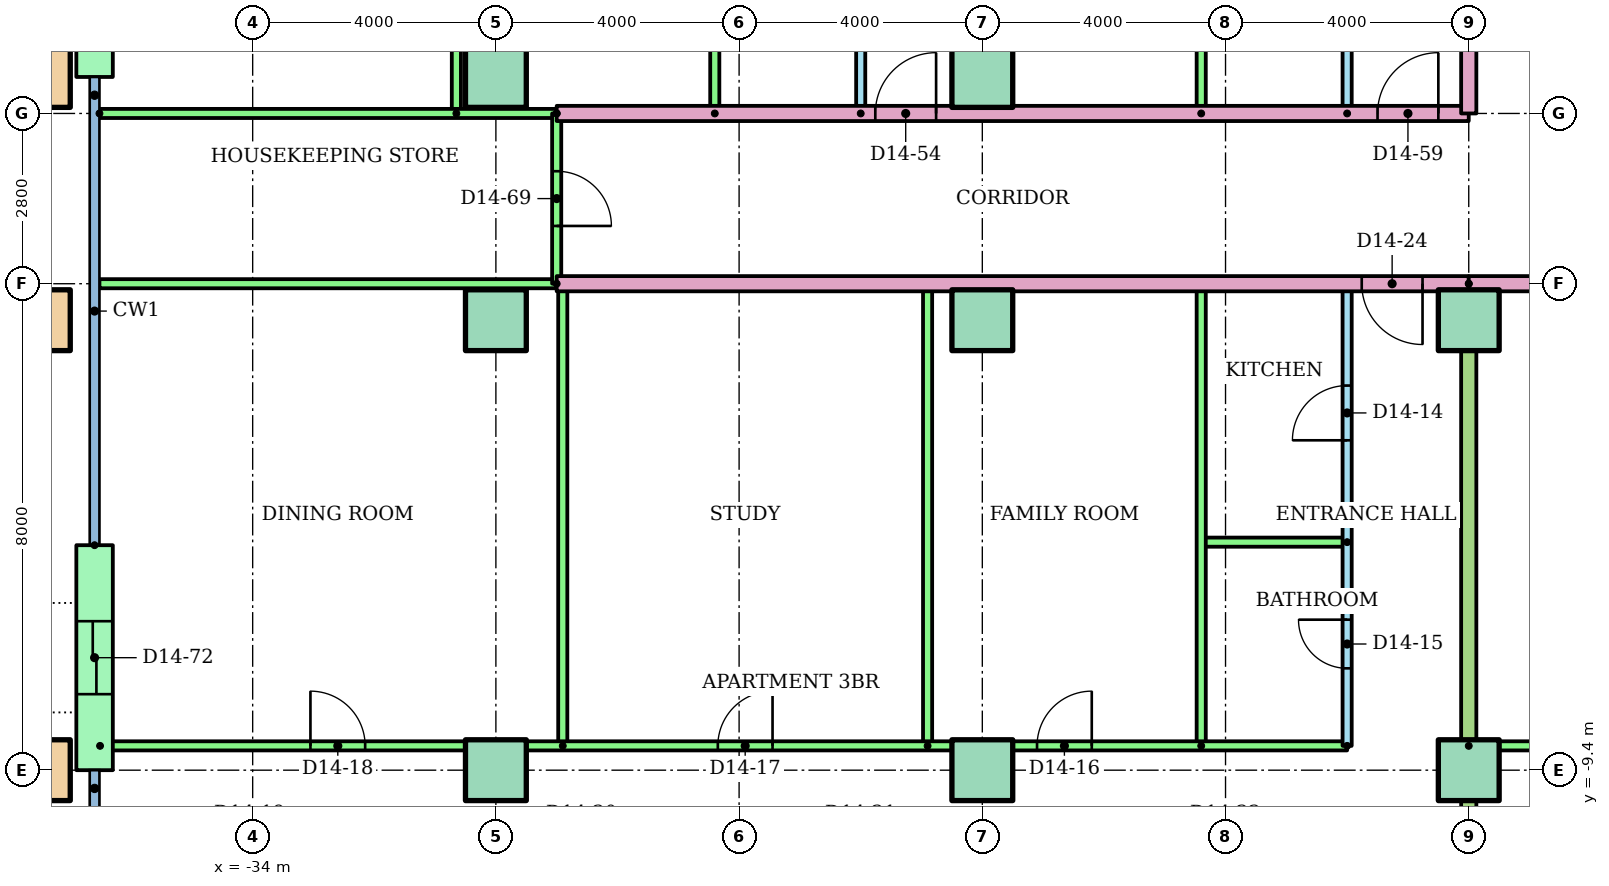
"""IFC4 building model, lengths in metres.
Left out: names, types, materials, properties, quantities, classifications, styles, units other than length and angle.
Written with IfcOpenShell. Run it as: python <this file> out.ifc"""

import sys

from ifc_helpers import new_model, si_unit, direction, frame, frame_2d, origin, origin_2d, place, context, subcontext, project, spatial, rectangle, hollow_rectangle, extrude, element, fill, save


model = new_model("IFC4")
c1 = context("Model", 3, precision=1e-05, world=origin(), true_north=direction((0.0, 1.0)))
c2 = subcontext(c1, "Body", "Model", "MODEL_VIEW")
j1 = project(units=[si_unit("LENGTHUNIT", "METRE"), si_unit("PLANEANGLEUNIT", "RADIAN")], contexts=[c1])
p1 = place(None, origin())
s1 = spatial("IfcSite", under=j1, at=p1, CompositionType="ELEMENT")
p2 = place(p1, origin())
s2 = spatial("IfcBuilding", under=s1, at=p2, CompositionType="ELEMENT")
p3 = place(p2, frame((0.0, 0.0, 54.4)))
s3 = spatial("IfcBuildingStorey", under=s2, at=p3, CompositionType="ELEMENT", Elevation=54.4)
p4 = place(p3, frame((-37.5, -9.4, 0.0)))
e1 = element("IfcColumn", 1, at=p4, inside=s3, PredefinedType="COLUMN", context=c2, shape_type="SweptSolid", body=[
    extrude(hollow_rectangle(XDim=1.0, YDim=1.0, WallThickness=0.05, at=origin_2d()), origin(), (0.0, 0.0, 1.0), 3.2),
])
for number, where in (
    (2, (-30.0, -9.4, 0.0)),
    (3, (-22.0, -9.4, 0.0)),
    (4, (-14.0, -9.4, 0.0)),
):
    element("IfcColumn", number, at=place(p3, frame(where)), inside=s3, PredefinedType="COLUMN", context=c2, shape_type="SweptSolid", body=[
        extrude(rectangle(XDim=1.0, YDim=1.0, at=origin_2d()), origin(), (0.0, 0.0, 1.0), 3.2),
    ])
p5 = place(p3, frame((-37.5, -2.0, 0.0)))
e5 = element("IfcColumn", 5, at=p5, inside=s3, PredefinedType="COLUMN", context=c2, shape_type="SweptSolid", body=[
    extrude(hollow_rectangle(XDim=1.0, YDim=1.0, WallThickness=0.05, at=origin_2d()), origin(), (0.0, 0.0, 1.0), 3.2),
])
for number, where in (
    (6, (-30.0, -2.0, 0.0)),
    (7, (-22.0, -2.0, 0.0)),
    (8, (-14.0, -2.0, 0.0)),
):
    element("IfcColumn", number, at=place(p3, frame(where)), inside=s3, PredefinedType="COLUMN", context=c2, shape_type="SweptSolid", body=[
        extrude(rectangle(XDim=1.0, YDim=1.0, at=origin_2d()), origin(), (0.0, 0.0, 1.0), 3.2),
    ])
p6 = place(p3, frame((-37.5, 2.0, 0.0)))
e9 = element("IfcColumn", 9, at=p6, inside=s3, PredefinedType="COLUMN", context=c2, shape_type="SweptSolid", body=[
    extrude(hollow_rectangle(XDim=1.0, YDim=1.0, WallThickness=0.05, at=origin_2d()), origin(), (0.0, 0.0, 1.0), 3.2),
])
for number, where in (
    (10, (-30.0, 2.0, 0.0)),
    (11, (-22.0, 2.0, 0.0)),
):
    element("IfcColumn", number, at=place(p3, frame(where)), inside=s3, PredefinedType="COLUMN", context=c2, shape_type="SweptSolid", body=[
        extrude(rectangle(XDim=1.0, YDim=1.0, at=origin_2d()), origin(), (0.0, 0.0, 1.0), 3.2),
    ])
p7 = place(p3, frame((-36.6, 6.5, 0.0), z_axis=(0.0, 0.0, 1.0), x_axis=(0.0, -1.0, 0.0)))
e12 = element("IfcWall", 12, at=p7, inside=s3, PredefinedType="STANDARD", context=c2, shape_type="SweptSolid", body=[
    extrude(rectangle(XDim=4.5, YDim=0.6, at=frame_2d((2.25, 0.0))), origin(), (0.0, 0.0, 1.0), 2.92),
])
p8 = place(p7, frame((1.65, 0.0, 0.0)))
e13 = element("IfcOpeningElement", 13, at=p8, cuts=e12, PredefinedType="OPENING", context=c2, shape_type="SweptSolid", body=[
    extrude(rectangle(XDim=1.2, YDim=2.1, at=frame_2d((0.6, 1.05))), frame((0.0, 0.31, 0.0), z_axis=(0.0, -1.0, 0.0), x_axis=(1.0, 0.0, 0.0)), (0.0, 0.0, 1.0), 0.62),
])
p9 = place(p3, frame((-36.6, -5.7, 0.0), z_axis=(0.0, 0.0, 1.0), x_axis=(0.0, -1.0, 0.0)))
e14 = element("IfcWall", 14, at=p9, inside=s3, PredefinedType="STANDARD", context=c2, shape_type="SweptSolid", body=[
    extrude(rectangle(XDim=3.7, YDim=0.6, at=frame_2d((1.85, 0.0))), origin(), (0.0, 0.0, 1.0), 2.92),
])
p10 = place(p9, frame((1.25, 0.0, 0.0)))
e15 = element("IfcOpeningElement", 15, at=p10, cuts=e14, PredefinedType="OPENING", context=c2, shape_type="SweptSolid", body=[
    extrude(rectangle(XDim=1.2, YDim=2.1, at=frame_2d((0.6, 1.05))), frame((0.0, 0.31, 0.0), z_axis=(0.0, -1.0, 0.0), x_axis=(1.0, 0.0, 0.0)), (0.0, 0.0, 1.0), 0.62),
])
p11 = place(p3, frame((-16.0, -9.0, 0.0), z_axis=(0.0, 0.0, 1.0), x_axis=(0.0, 1.0, 0.0)))
e16 = element("IfcWall", 16, at=p11, inside=s3, PredefinedType="PARTITIONING", context=c2, shape_type="SweptSolid", body=[
    extrude(rectangle(XDim=7.6, YDim=0.15, at=frame_2d((3.8, 0.0))), origin(), (0.0, 0.0, 1.0), 2.4),
])
p12 = place(p11, frame((5.025, 0.0, 0.0)))
e17 = element("IfcOpeningElement", 17, at=p12, cuts=e16, PredefinedType="OPENING", context=c2, shape_type="SweptSolid", body=[
    extrude(rectangle(XDim=0.9, YDim=2.1, at=frame_2d((0.45, 1.05))), frame((0.0, 0.085, 0.0), z_axis=(0.0, -1.0, 0.0), x_axis=(1.0, 0.0, 0.0)), (0.0, 0.0, 1.0), 0.17),
])
p13 = place(p11, frame((1.275, 0.0, 0.0)))
e18 = element("IfcOpeningElement", 18, at=p13, cuts=e16, PredefinedType="OPENING", context=c2, shape_type="SweptSolid", body=[
    extrude(rectangle(XDim=0.8, YDim=2.1, at=frame_2d((0.4, 1.05))), frame((0.0, 0.085, 0.0), z_axis=(0.0, -1.0, 0.0), x_axis=(1.0, 0.0, 0.0)), (0.0, 0.0, 1.0), 0.17),
])
p14 = place(p3, frame((-16.0, -5.65, 0.0), z_axis=(0.0, 0.0, 1.0), x_axis=(-1.0, 0.0, 0.0)))
e19 = element("IfcWall", 19, at=p14, inside=s3, PredefinedType="PARTITIONING", context=c2, shape_type="SweptSolid", body=[
    extrude(rectangle(XDim=2.4, YDim=0.15, at=frame_2d((1.2, 0.0))), origin(), (0.0, 0.0, 1.0), 2.4),
])
for number, where, z_axis, x_axis in (
    (20, (-18.4, -9.0, 0.0), (0.0, 0.0, 1.0), (0.0, 1.0, 0.0)),
    (21, (-22.9, -9.0, 0.0), (0.0, 0.0, 1.0), (0.0, 1.0, 0.0)),
    (22, (-28.9, -9.0, 0.0), (0.0, 0.0, 1.0), (0.0, 1.0, 0.0)),
):
    element("IfcWall", number, at=place(p3, frame(where, z_axis=z_axis, x_axis=x_axis)), inside=s3, PredefinedType="PARTITIONING", context=c2, shape_type="SweptSolid", body=[
        extrude(rectangle(XDim=7.6, YDim=0.15, at=frame_2d((3.8, 0.0))), origin(), (0.0, 0.0, 1.0), 2.4),
    ])
p15 = place(p3, frame((-36.51, -9.0, 0.0)))
e23 = element("IfcWall", 23, at=p15, inside=s3, PredefinedType="PARTITIONING", context=c2, shape_type="SweptSolid", body=[
    extrude(rectangle(XDim=20.51, YDim=0.15, at=frame_2d((10.255, 0.0))), origin(), (0.0, 0.0, 1.0), 2.4),
])
p16 = place(p15, frame((15.41, 0.0, 0.0)))
e24 = element("IfcOpeningElement", 24, at=p16, cuts=e23, PredefinedType="OPENING", context=c2, shape_type="SweptSolid", body=[
    extrude(rectangle(XDim=0.9, YDim=2.1, at=frame_2d((0.45, 1.05))), frame((0.0, 0.085, 0.0), z_axis=(0.0, -1.0, 0.0), x_axis=(1.0, 0.0, 0.0)), (0.0, 0.0, 1.0), 0.17),
])
p17 = place(p15, frame((10.16, 0.0, 0.0)))
e25 = element("IfcOpeningElement", 25, at=p17, cuts=e23, PredefinedType="OPENING", context=c2, shape_type="SweptSolid", body=[
    extrude(rectangle(XDim=0.9, YDim=2.1, at=frame_2d((0.45, 1.05))), frame((0.0, 0.085, 0.0), z_axis=(0.0, -1.0, 0.0), x_axis=(1.0, 0.0, 0.0)), (0.0, 0.0, 1.0), 0.17),
])
p18 = place(p15, frame((3.46, 0.0, 0.0)))
e26 = element("IfcOpeningElement", 26, at=p18, cuts=e23, PredefinedType="OPENING", context=c2, shape_type="SweptSolid", body=[
    extrude(rectangle(XDim=0.9, YDim=2.1, at=frame_2d((0.45, 1.05))), frame((0.0, 0.085, 0.0), z_axis=(0.0, -1.0, 0.0), x_axis=(1.0, 0.0, 0.0)), (0.0, 0.0, 1.0), 0.17),
])
p19 = place(p3, frame((-14.0, -9.0, 0.0)))
e27 = element("IfcWall", 27, at=p19, inside=s3, PredefinedType="PARTITIONING", context=c2, shape_type="SweptSolid", body=[
    extrude(rectangle(XDim=22.0, YDim=0.15, at=frame_2d((11.0, 0.0))), origin(), (0.0, 0.0, 1.0), 2.4),
])
p20 = place(p19, frame((16.76, 0.0, 0.0)))
e28 = element("IfcOpeningElement", 28, at=p20, cuts=e27, PredefinedType="OPENING", context=c2, shape_type="SweptSolid", body=[
    extrude(rectangle(XDim=0.9, YDim=2.1, at=frame_2d((0.45, 1.05))), frame((0.0, 0.085, 0.0), z_axis=(0.0, -1.0, 0.0), x_axis=(1.0, 0.0, 0.0)), (0.0, 0.0, 1.0), 0.17),
])
p21 = place(p19, frame((10.9, 0.0, 0.0)))
e29 = element("IfcOpeningElement", 29, at=p21, cuts=e27, PredefinedType="OPENING", context=c2, shape_type="SweptSolid", body=[
    extrude(rectangle(XDim=0.9, YDim=2.1, at=frame_2d((0.45, 1.05))), frame((0.0, 0.085, 0.0), z_axis=(0.0, -1.0, 0.0), x_axis=(1.0, 0.0, 0.0)), (0.0, 0.0, 1.0), 0.17),
])
p22 = place(p19, frame((3.6, 0.0, 0.0)))
e30 = element("IfcOpeningElement", 30, at=p22, cuts=e27, PredefinedType="OPENING", context=c2, shape_type="SweptSolid", body=[
    extrude(rectangle(XDim=0.9, YDim=2.1, at=frame_2d((0.45, 1.05))), frame((0.0, 0.085, 0.0), z_axis=(0.0, -1.0, 0.0), x_axis=(1.0, 0.0, 0.0)), (0.0, 0.0, 1.0), 0.17),
])
p23 = place(p3, frame((-14.0, -1.4, 0.0), z_axis=(0.0, 0.0, 1.0), x_axis=(0.0, -1.0, 0.0)))
e31 = element("IfcWall", 31, at=p23, inside=s3, PredefinedType="PARTITIONING", context=c2, shape_type="SweptSolid", body=[
    extrude(rectangle(XDim=14.71, YDim=0.25, at=frame_2d((7.355, 0.0))), origin(), (0.0, 0.0, 1.0), 2.4),
])
p24 = place(p3, frame((-14.0, -1.4, 0.0), z_axis=(0.0, 0.0, 1.0), x_axis=(-1.0, 0.0, 0.0)))
e32 = element("IfcWall", 32, at=p24, inside=s3, PredefinedType="PARTITIONING", context=c2, shape_type="SweptSolid", body=[
    extrude(rectangle(XDim=15.0, YDim=0.25, at=frame_2d((7.5, 0.0))), origin(), (0.0, 0.0, 1.0), 2.4),
])
p25 = place(p24, frame((0.76, 0.0, 0.0)))
e33 = element("IfcOpeningElement", 33, at=p25, cuts=e32, PredefinedType="OPENING", context=c2, shape_type="SweptSolid", body=[
    extrude(rectangle(XDim=1.0, YDim=2.1, at=frame_2d((0.5, 1.05))), frame((0.0, 0.135, 0.0), z_axis=(0.0, -1.0, 0.0), x_axis=(1.0, 0.0, 0.0)), (0.0, 0.0, 1.0), 0.27),
])
p26 = place(p3, frame((-29.0, -1.4, 0.0), z_axis=(0.0, 0.0, 1.0), x_axis=(-1.0, 0.0, 0.0)))
e34 = element("IfcWall", 34, at=p26, inside=s3, PredefinedType="PARTITIONING", context=c2, shape_type="SweptSolid", body=[
    extrude(rectangle(XDim=7.52, YDim=0.15, at=frame_2d((3.76, 0.0))), origin(), (0.0, 0.0, 1.0), 2.4),
])
p27 = place(p3, frame((-24.0, 1.4, 0.0), z_axis=(0.0, 0.0, 1.0), x_axis=(0.0, 1.0, 0.0)))
e35 = element("IfcWall", 35, at=p27, inside=s3, PredefinedType="PARTITIONING", context=c2, shape_type="SweptSolid", body=[
    extrude(rectangle(XDim=10.0, YDim=0.15, at=frame_2d((5.0, 0.0))), origin(), (0.0, 0.0, 1.0), 2.4),
])
p28 = place(p27, frame((2.3, 0.0, 0.0)))
e36 = element("IfcOpeningElement", 36, at=p28, cuts=e35, PredefinedType="OPENING", context=c2, shape_type="SweptSolid", body=[
    extrude(rectangle(XDim=0.9, YDim=2.1, at=frame_2d((0.45, 1.05))), frame((0.0, 0.085, 0.0), z_axis=(0.0, -1.0, 0.0), x_axis=(1.0, 0.0, 0.0)), (0.0, 0.0, 1.0), 0.17),
])
p29 = place(p27, frame((7.35, 0.0, 0.0)))
e37 = element("IfcOpeningElement", 37, at=p29, cuts=e35, PredefinedType="OPENING", context=c2, shape_type="SweptSolid", body=[
    extrude(rectangle(XDim=0.8, YDim=2.1, at=frame_2d((0.4, 1.05))), frame((0.0, 0.085, 0.0), z_axis=(0.0, -1.0, 0.0), x_axis=(1.0, 0.0, 0.0)), (0.0, 0.0, 1.0), 0.17),
])
for number, where, z_axis, x_axis in (
    (38, (-26.4, 1.4, 0.0), (0.0, 0.0, 1.0), (0.0, 1.0, 0.0)),
    (39, (-30.65, 1.4, 0.0), (0.0, 0.0, 1.0), (0.0, 1.0, 0.0)),
):
    element("IfcWall", number, at=place(p3, frame(where, z_axis=z_axis, x_axis=x_axis)), inside=s3, PredefinedType="PARTITIONING", context=c2, shape_type="SweptSolid", body=[
        extrude(rectangle(XDim=10.0, YDim=0.15, at=frame_2d((5.0, 0.0))), origin(), (0.0, 0.0, 1.0), 2.4),
    ])
p30 = place(p3, frame((-16.0, 1.4, 0.0), z_axis=(0.0, 0.0, 1.0), x_axis=(0.0, 1.0, 0.0)))
e40 = element("IfcWall", 40, at=p30, inside=s3, PredefinedType="PARTITIONING", context=c2, shape_type="SweptSolid", body=[
    extrude(rectangle(XDim=10.0, YDim=0.15, at=frame_2d((5.0, 0.0))), origin(), (0.0, 0.0, 1.0), 2.4),
])
p31 = place(p30, frame((2.3, 0.0, 0.0)))
e41 = element("IfcOpeningElement", 41, at=p31, cuts=e40, PredefinedType="OPENING", context=c2, shape_type="SweptSolid", body=[
    extrude(rectangle(XDim=0.9, YDim=2.1, at=frame_2d((0.45, 1.05))), frame((0.0, 0.085, 0.0), z_axis=(0.0, -1.0, 0.0), x_axis=(1.0, 0.0, 0.0)), (0.0, 0.0, 1.0), 0.17),
])
p32 = place(p30, frame((7.35, 0.0, 0.0)))
e42 = element("IfcOpeningElement", 42, at=p32, cuts=e40, PredefinedType="OPENING", context=c2, shape_type="SweptSolid", body=[
    extrude(rectangle(XDim=0.8, YDim=2.1, at=frame_2d((0.4, 1.05))), frame((0.0, 0.085, 0.0), z_axis=(0.0, -1.0, 0.0), x_axis=(1.0, 0.0, 0.0)), (0.0, 0.0, 1.0), 0.17),
])
p33 = place(p3, frame((-18.4, 1.4, 0.0), z_axis=(0.0, 0.0, 1.0), x_axis=(0.0, 1.0, 0.0)))
e43 = element("IfcWall", 43, at=p33, inside=s3, PredefinedType="PARTITIONING", context=c2, shape_type="SweptSolid", body=[
    extrude(rectangle(XDim=10.0, YDim=0.15, at=frame_2d((5.0, 0.0))), origin(), (0.0, 0.0, 1.0), 2.4),
])
p34 = place(p3, frame((-22.0, 18.521, 0.0), z_axis=(0.0, 0.0, 1.0), x_axis=(0.0, -1.0, 0.0)))
e44 = element("IfcWall", 44, at=p34, inside=s3, PredefinedType="PARTITIONING", context=c2, shape_type="SweptSolid", body=[
    extrude(rectangle(XDim=17.121, YDim=0.25, at=frame_2d((8.561, 0.0))), origin(), (0.0, 0.0, 1.0), 2.4),
])
p35 = place(p3, frame((-29.0, 1.4, 0.0)))
e45 = element("IfcWall", 45, at=p35, inside=s3, PredefinedType="PARTITIONING", context=c2, shape_type="SweptSolid", body=[
    extrude(rectangle(XDim=15.0, YDim=0.25, at=frame_2d((7.5, 0.0))), origin(), (0.0, 0.0, 1.0), 2.4),
])
p36 = place(p35, frame((5.24, 0.0, 0.0)))
e46 = element("IfcOpeningElement", 46, at=p36, cuts=e45, PredefinedType="OPENING", context=c2, shape_type="SweptSolid", body=[
    extrude(rectangle(XDim=1.0, YDim=2.1, at=frame_2d((0.5, 1.05))), frame((0.0, 0.135, 0.0), z_axis=(0.0, -1.0, 0.0), x_axis=(1.0, 0.0, 0.0)), (0.0, 0.0, 1.0), 0.27),
])
p37 = place(p35, frame((13.5, 0.0, 0.0)))
e47 = element("IfcOpeningElement", 47, at=p37, cuts=e45, PredefinedType="OPENING", context=c2, shape_type="SweptSolid", body=[
    extrude(rectangle(XDim=1.0, YDim=2.1, at=frame_2d((0.5, 1.05))), frame((0.0, 0.135, 0.0), z_axis=(0.0, -1.0, 0.0), x_axis=(1.0, 0.0, 0.0)), (0.0, 0.0, 1.0), 0.27),
])
p38 = place(p3, frame((-36.52, 1.4, 0.0)))
e48 = element("IfcWall", 48, at=p38, inside=s3, PredefinedType="PARTITIONING", context=c2, shape_type="SweptSolid", body=[
    extrude(rectangle(XDim=7.52, YDim=0.15, at=frame_2d((3.76, 0.0))), origin(), (0.0, 0.0, 1.0), 2.4),
])
p39 = place(p3, frame((-29.0, 1.4, 0.0), z_axis=(0.0, 0.0, 1.0), x_axis=(0.0, -1.0, 0.0)))
e49 = element("IfcWall", 49, at=p39, inside=s3, PredefinedType="PARTITIONING", context=c2, shape_type="SweptSolid", body=[
    extrude(rectangle(XDim=2.8, YDim=0.15, at=frame_2d((1.4, 0.0))), origin(), (0.0, 0.0, 1.0), 2.4),
])
p40 = place(p39, frame((0.95, 0.0, 0.0)))
e50 = element("IfcOpeningElement", 50, at=p40, cuts=e49, PredefinedType="OPENING", context=c2, shape_type="SweptSolid", body=[
    extrude(rectangle(XDim=0.9, YDim=2.1, at=frame_2d((0.45, 1.05))), frame((0.0, 0.085, 0.0), z_axis=(0.0, -1.0, 0.0), x_axis=(1.0, 0.0, 0.0)), (0.0, 0.0, 1.0), 0.17),
])
p41 = place(p3, frame((14.0, -1.4, 0.0), z_axis=(0.0, 0.0, 1.0), x_axis=(-1.0, 0.0, 0.0)))
e51 = element("IfcWall", 51, at=p41, inside=s3, PredefinedType="PARTITIONING", context=c2, shape_type="SweptSolid", body=[
    extrude(rectangle(XDim=28.0, YDim=0.25, at=frame_2d((14.0, 0.0))), origin(), (0.0, 0.0, 1.0), 2.4),
])
p42 = place(p41, frame((4.76, 0.0, 0.0)))
e52 = element("IfcOpeningElement", 52, at=p42, cuts=e51, PredefinedType="OPENING", context=c2, shape_type="SweptSolid", body=[
    extrude(rectangle(XDim=1.0, YDim=2.1, at=frame_2d((0.5, 1.05))), frame((0.0, 0.135, 0.0), z_axis=(0.0, -1.0, 0.0), x_axis=(1.0, 0.0, 0.0)), (0.0, 0.0, 1.0), 0.27),
])
p43 = place(p41, frame((2.24, 0.0, 0.0)))
e53 = element("IfcOpeningElement", 53, at=p43, cuts=e51, PredefinedType="OPENING", context=c2, shape_type="SweptSolid", body=[
    extrude(rectangle(XDim=1.0, YDim=2.1, at=frame_2d((0.5, 1.05))), frame((0.0, 0.135, 0.0), z_axis=(0.0, -1.0, 0.0), x_axis=(1.0, 0.0, 0.0)), (0.0, 0.0, 1.0), 0.27),
])
p44 = place(p3, frame((-14.0, 3.0, 0.0), z_axis=(0.0, 0.0, 1.0), x_axis=(0.0, -1.0, 0.0)))
e54 = element("IfcWall", 54, at=p44, inside=s3, PredefinedType="PARTITIONING", context=c2, shape_type="SweptSolid", body=[
    extrude(rectangle(XDim=1.6, YDim=0.25, at=frame_2d((0.8, 0.0))), origin(), (0.0, 0.0, 1.0), 2.4),
])
p45 = place(p12, origin())
e55 = element("IfcDoor", 55, at=p45, inside=s3, OperationType="SINGLE_SWING_LEFT", PredefinedType="DOOR", context=c2, shape_type="SweptSolid", body=[
    extrude(rectangle(XDim=0.9, YDim=2.1, at=frame_2d((0.45, 1.05))), frame((0.0, 0.025, 0.0), z_axis=(0.0, -1.0, 0.0), x_axis=(1.0, 0.0, 0.0)), (0.0, 0.0, 1.0), 0.05),
])
fill(e17, e55)
p46 = place(p13, origin())
e56 = element("IfcDoor", 56, at=p46, inside=s3, OperationType="SINGLE_SWING_RIGHT", PredefinedType="DOOR", context=c2, shape_type="SweptSolid", body=[
    extrude(rectangle(XDim=0.8, YDim=2.1, at=frame_2d((0.4, 1.05))), frame((0.0, 0.025, 0.0), z_axis=(0.0, -1.0, 0.0), x_axis=(1.0, 0.0, 0.0)), (0.0, 0.0, 1.0), 0.05),
])
fill(e18, e56)
p47 = place(p16, origin())
e57 = element("IfcDoor", 57, at=p47, inside=s3, OperationType="SINGLE_SWING_RIGHT", PredefinedType="DOOR", context=c2, shape_type="SweptSolid", body=[
    extrude(rectangle(XDim=0.9, YDim=2.1, at=frame_2d((0.45, 1.05))), frame((0.0, 0.025, 0.0), z_axis=(0.0, -1.0, 0.0), x_axis=(1.0, 0.0, 0.0)), (0.0, 0.0, 1.0), 0.05),
])
fill(e24, e57)
p48 = place(p17, origin())
e58 = element("IfcDoor", 58, at=p48, inside=s3, OperationType="SINGLE_SWING_RIGHT", PredefinedType="DOOR", context=c2, shape_type="SweptSolid", body=[
    extrude(rectangle(XDim=0.9, YDim=2.1, at=frame_2d((0.45, 1.05))), frame((0.0, 0.025, 0.0), z_axis=(0.0, -1.0, 0.0), x_axis=(1.0, 0.0, 0.0)), (0.0, 0.0, 1.0), 0.05),
])
fill(e25, e58)
p49 = place(p18, origin())
e59 = element("IfcDoor", 59, at=p49, inside=s3, OperationType="SINGLE_SWING_LEFT", PredefinedType="DOOR", context=c2, shape_type="SweptSolid", body=[
    extrude(rectangle(XDim=0.9, YDim=2.1, at=frame_2d((0.45, 1.05))), frame((0.0, 0.025, 0.0), z_axis=(0.0, -1.0, 0.0), x_axis=(1.0, 0.0, 0.0)), (0.0, 0.0, 1.0), 0.05),
])
fill(e26, e59)
p50 = place(p25, origin())
e60 = element("IfcDoor", 60, at=p50, inside=s3, OperationType="SINGLE_SWING_LEFT", PredefinedType="DOOR", context=c2, shape_type="SweptSolid", body=[
    extrude(rectangle(XDim=1.0, YDim=2.1, at=frame_2d((0.5, 1.05))), frame((0.0, 0.025, 0.0), z_axis=(0.0, -1.0, 0.0), x_axis=(1.0, 0.0, 0.0)), (0.0, 0.0, 1.0), 0.05),
])
fill(e33, e60)
p51 = place(p36, origin())
e61 = element("IfcDoor", 61, at=p51, inside=s3, OperationType="SINGLE_SWING_RIGHT", PredefinedType="DOOR", context=c2, shape_type="SweptSolid", body=[
    extrude(rectangle(XDim=1.0, YDim=2.1, at=frame_2d((0.5, 1.05))), frame((0.0, 0.025, 0.0), z_axis=(0.0, -1.0, 0.0), x_axis=(1.0, 0.0, 0.0)), (0.0, 0.0, 1.0), 0.05),
])
fill(e46, e61)
p52 = place(p37, origin())
e62 = element("IfcDoor", 62, at=p52, inside=s3, OperationType="SINGLE_SWING_RIGHT", PredefinedType="DOOR", context=c2, shape_type="SweptSolid", body=[
    extrude(rectangle(XDim=1.0, YDim=2.1, at=frame_2d((0.5, 1.05))), frame((0.0, 0.025, 0.0), z_axis=(0.0, -1.0, 0.0), x_axis=(1.0, 0.0, 0.0)), (0.0, 0.0, 1.0), 0.05),
])
fill(e47, e62)
p53 = place(p40, origin())
e63 = element("IfcDoor", 63, at=p53, inside=s3, OperationType="SINGLE_SWING_RIGHT", PredefinedType="DOOR", context=c2, shape_type="SweptSolid", body=[
    extrude(rectangle(XDim=0.9, YDim=2.1, at=frame_2d((0.45, 1.05))), frame((0.0, 0.025, 0.0), z_axis=(0.0, -1.0, 0.0), x_axis=(1.0, 0.0, 0.0)), (0.0, 0.0, 1.0), 0.05),
])
fill(e50, e63)
p54 = place(p10, origin())
e64 = element("IfcDoor", 64, at=p54, inside=s3, OperationType="SLIDING_TO_LEFT", PredefinedType="DOOR", context=c2, shape_type="SweptSolid", body=[
    extrude(rectangle(XDim=1.2, YDim=2.1, at=frame_2d((0.6, 1.05))), frame((0.0, 0.025, 0.0), z_axis=(0.0, -1.0, 0.0), x_axis=(1.0, 0.0, 0.0)), (0.0, 0.0, 1.0), 0.05),
])
fill(e15, e64)
save(model, sys.argv[1])
